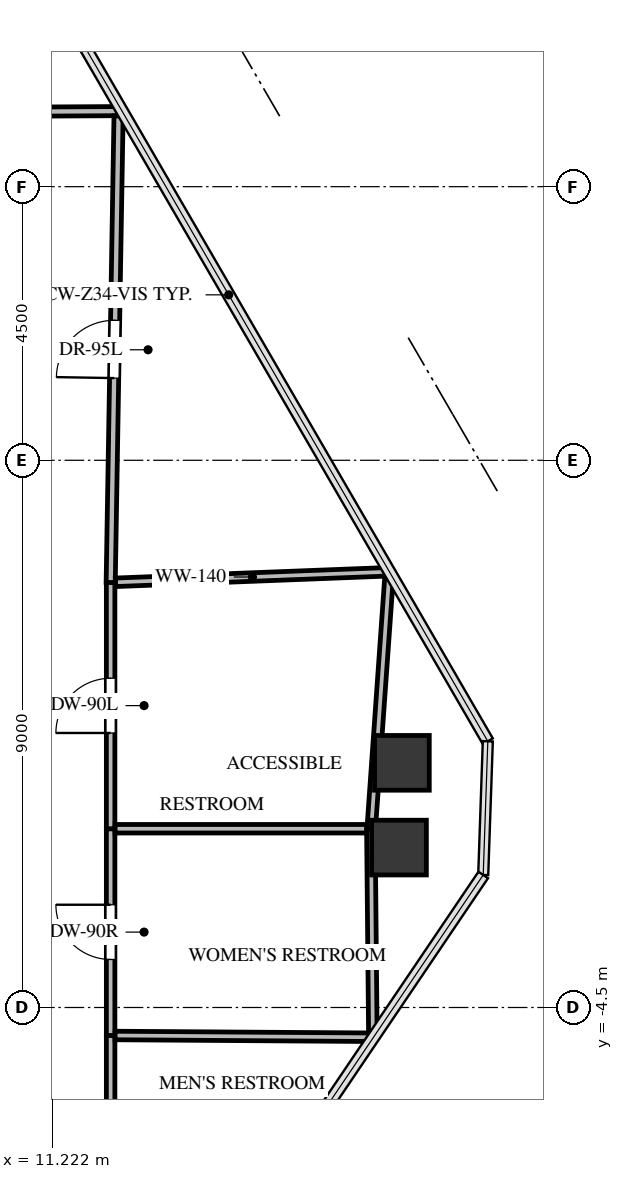
"""IFC4 building model, lengths in metres.
Left out: names, types, materials, properties, quantities, classifications, styles, units other than length and angle.
Written with IfcOpenShell. Run it as: python <this file> out.ifc"""

import sys

from ifc_helpers import new_model, si_unit, direction, frame, frame_2d, origin, origin_2d, place, context, subcontext, project, spatial, rectangle, extrude, source, transform, mapped, element, fill, save


model = new_model("IFC4")
c1 = context("Model", 3, precision=1e-05, world=origin(), true_north=direction((0.0, 1.0)))
c2 = subcontext(c1, "Body", "Model", "MODEL_VIEW")
j1 = project(units=[si_unit("LENGTHUNIT", "METRE"), si_unit("PLANEANGLEUNIT", "RADIAN")], contexts=[c1])
p1 = place(None, origin())
s1 = spatial("IfcSite", under=j1, at=p1, CompositionType="ELEMENT")
p2 = place(p1, origin())
s2 = spatial("IfcBuilding", under=s1, at=p2, CompositionType="ELEMENT")
p3 = place(p2, frame((0.0, 0.0, 244.7)))
s3 = spatial("IfcBuildingStorey", under=s2, at=p3, CompositionType="ELEMENT", Elevation=244.7)
m1 = source(origin(), c2, "Body", "SweptSolid", [
    extrude(rectangle(XDim=0.9, YDim=0.9, at=origin_2d()), origin(), (0.0, 0.0, 1.0), 3.3),
])
for number, where, z_axis, x_axis in (
    (1, (16.97, -0.476, -0.24), (0.0, 0.0, 1.0), (1.0, 0.0, 0.0)),
    (2, (16.922, -1.87, -0.24), (0.0, 0.0, 1.0), (1.0, 0.0, 0.0)),
):
    element("IfcColumn", number, at=place(p3, frame(where, z_axis=z_axis, x_axis=x_axis)), inside=s3, PredefinedType="COLUMN", context=c2, shape_type="MappedRepresentation", body=[
        mapped(m1, transform((0.0, 0.0, 0.0), x_axis=(1.0, 0.0, 0.0), y_axis=(0.0, 1.0, 0.0), z_axis=(0.0, 0.0, 1.0), scale=1.0)),
    ])
p4 = place(p3, frame((12.18, -8.44, 0.0), z_axis=(0.0, 0.0, 1.0), x_axis=(0.0, 1.0, 0.0)))
e3 = element("IfcWall", 3, at=p4, inside=s3, PredefinedType="PARTITIONING", context=c2, shape_type="SweptSolid", body=[
    extrude(rectangle(XDim=3.48, YDim=0.14, at=frame_2d((1.74, 0.0))), origin(), (0.0, 0.0, 1.0), 2.399),
])
p5 = place(p4, frame((1.29, 0.0, 0.0)))
e4 = element("IfcOpeningElement", 4, at=p5, cuts=e3, PredefinedType="OPENING", context=c2, shape_type="SweptSolid", body=[
    extrude(rectangle(XDim=0.9, YDim=2.05, at=frame_2d((0.45, 1.025))), frame((0.0, 0.08, 0.0), z_axis=(0.0, -1.0, 0.0), x_axis=(1.0, 0.0, 0.0)), (0.0, 0.0, 1.0), 0.16),
])
p6 = place(p3, frame((12.18, -4.96, 0.0), z_axis=(0.0, 0.0, 1.0), x_axis=(0.0, 1.0, 0.0)))
e5 = element("IfcWall", 5, at=p6, inside=s3, PredefinedType="PARTITIONING", context=c2, shape_type="SweptSolid", body=[
    extrude(rectangle(XDim=3.4, YDim=0.14, at=frame_2d((1.7, 0.0))), origin(), (0.0, 0.0, 1.0), 3.045),
])
p7 = place(p6, frame((1.25, 0.0, 0.0)))
e6 = element("IfcOpeningElement", 6, at=p7, cuts=e5, PredefinedType="OPENING", context=c2, shape_type="SweptSolid", body=[
    extrude(rectangle(XDim=0.9, YDim=2.05, at=frame_2d((0.45, 1.025))), frame((0.0, 0.08, 0.0), z_axis=(0.0, -1.0, 0.0), x_axis=(1.0, 0.0, 0.0)), (0.0, 0.0, 1.0), 0.16),
])
p8 = place(p3, frame((12.18, -1.56, 0.0), z_axis=(0.0, 0.0, 1.0), x_axis=(0.0, 1.0, 0.0)))
e7 = element("IfcWall", 7, at=p8, inside=s3, PredefinedType="PARTITIONING", context=c2, shape_type="SweptSolid", body=[
    extrude(rectangle(XDim=4.05, YDim=0.14, at=frame_2d((2.025, 0.0))), origin(), (0.0, 0.0, 1.0), 2.301),
])
p9 = place(p8, frame((1.575, 0.0, 0.0)))
e8 = element("IfcOpeningElement", 8, at=p9, cuts=e7, PredefinedType="OPENING", context=c2, shape_type="SweptSolid", body=[
    extrude(rectangle(XDim=0.9, YDim=2.05, at=frame_2d((0.45, 1.025))), frame((0.0, 0.08, 0.0), z_axis=(0.0, -1.0, 0.0), x_axis=(1.0, 0.0, 0.0)), (0.0, 0.0, 1.0), 0.16),
])
p10 = place(p3, frame((12.368, 10.243, 0.0), z_axis=(0.0, 0.0, 1.0), x_axis=(-0.999984623931, -0.005545439622, 0.0)))
e9 = element("IfcWall", 9, at=p10, inside=s3, PredefinedType="PARTITIONING", context=c2, shape_type="SweptSolid", body=[
    extrude(rectangle(XDim=11.359, YDim=0.15, at=frame_2d((5.679, 0.0))), origin(), (0.0, 0.0, 1.0), 2.301),
])
p11 = place(p10, frame((5.219, 0.0, 0.0)))
e10 = element("IfcOpeningElement", 10, at=p11, cuts=e9, PredefinedType="OPENING", context=c2, shape_type="SweptSolid", body=[
    extrude(rectangle(XDim=0.92, YDim=2.1, at=frame_2d((0.46, 1.05))), frame((0.0, 0.085, 0.0), z_axis=(0.0, -1.0, 0.0), x_axis=(1.0, 0.0, 0.0)), (0.0, 0.0, 1.0), 0.17),
])
p12 = place(p3, frame((12.181, 2.49, 0.0), z_axis=(0.0, 0.0, 1.0), x_axis=(0.016828134389, 0.999858396921, 0.0)))
e11 = element("IfcWall", 11, at=p12, inside=s3, PredefinedType="PARTITIONING", context=c2, shape_type="SweptSolid", body=[
    extrude(rectangle(XDim=7.675, YDim=0.15, at=frame_2d((3.837, 0.0))), origin(), (0.0, 0.0, 1.0), 2.399),
])
p13 = place(p12, frame((3.362, 0.0, 0.0)))
e12 = element("IfcOpeningElement", 12, at=p13, cuts=e11, PredefinedType="OPENING", context=c2, shape_type="SweptSolid", body=[
    extrude(rectangle(XDim=0.95, YDim=2.1, at=frame_2d((0.475, 1.05))), frame((0.0, 0.085, 0.0), z_axis=(0.0, -1.0, 0.0), x_axis=(1.0, 0.0, 0.0)), (0.0, 0.0, 1.0), 0.17),
])
p14 = place(p3, frame((12.254, -4.96, 0.0), z_axis=(0.0, 0.0, 1.0), x_axis=(0.999976630429, -0.006836563198, 0.0)))
e13 = element("IfcWall", 13, at=p14, inside=s3, PredefinedType="PARTITIONING", context=c2, shape_type="SweptSolid", body=[
    extrude(rectangle(XDim=4.25, YDim=0.14, at=frame_2d((2.125, 0.0))), origin(), (0.0, 0.0, 1.0), 2.399),
])
p15 = place(p3, frame((12.254, -1.56, 0.0), z_axis=(0.0, 0.0, 1.0), x_axis=(1.0, 0.0, 0.0)))
e14 = element("IfcWall", 14, at=p15, inside=s3, PredefinedType="PARTITIONING", context=c2, shape_type="SweptSolid", body=[
    extrude(rectangle(XDim=4.206, YDim=0.14, at=frame_2d((2.103, 0.0))), origin(), (0.0, 0.0, 1.0), 2.301),
])
p16 = place(p3, frame((16.46, -1.56, 0.0), z_axis=(0.0, 0.0, 1.0), x_axis=(0.009604446748, -0.999953876238, 0.0)))
e15 = element("IfcWall", 15, at=p16, inside=s3, PredefinedType="PARTITIONING", context=c2, shape_type="SweptSolid", body=[
    extrude(rectangle(XDim=3.355, YDim=0.14, at=frame_2d((1.678, 0.0))), origin(), (0.0, 0.0, 1.0), 2.301),
])
p17 = place(p3, frame((12.26, 2.493, 0.0), z_axis=(0.0, 0.0, 1.0), x_axis=(0.999256206289, 0.038562082324, 0.0)))
e16 = element("IfcWall", 16, at=p17, inside=s3, PredefinedType="PARTITIONING", context=c2, shape_type="SweptSolid", body=[
    extrude(rectangle(XDim=4.508, YDim=0.14, at=frame_2d((2.254, 0.0))), origin(), (0.0, 0.0, 1.0), 2.399),
])
p18 = place(p3, frame((16.76, 2.593, 0.0), z_axis=(0.0, 0.0, 1.0), x_axis=(-0.07055102187, -0.997508172053, 0.0)))
e17 = element("IfcWall", 17, at=p18, inside=s3, PredefinedType="PARTITIONING", context=c2, shape_type="SweptSolid", body=[
    extrude(rectangle(XDim=4.163, YDim=0.14, at=frame_2d((2.082, 0.0))), origin(), (0.0, 0.0, 1.0), 2.301),
])
m2 = source(origin(), c2, "Body", "SweptSolid", [
    extrude(rectangle(XDim=0.9, YDim=2.05, at=frame_2d((0.45, 1.025))), frame((0.0, 0.025, 0.0), z_axis=(0.0, -1.0, 0.0), x_axis=(1.0, 0.0, 0.0)), (0.0, 0.0, 1.0), 0.05),
])
p19 = place(p7, origin())
e18 = element("IfcDoor", 18, at=p19, inside=s3, OperationType="SINGLE_SWING_RIGHT", PredefinedType="DOOR", context=c2, shape_type="MappedRepresentation", body=[
    mapped(m2, transform((0.0, 0.0, 0.0), x_axis=(1.0, 0.0, 0.0), y_axis=(0.0, 1.0, 0.0), z_axis=(0.0, 0.0, 1.0), scale=1.0)),
])
fill(e6, e18)
m3 = source(origin(), c2, "Body", "SweptSolid", [
    extrude(rectangle(XDim=0.9, YDim=2.05, at=frame_2d((0.45, 1.025))), frame((0.0, 0.025, 0.0), z_axis=(0.0, -1.0, 0.0), x_axis=(1.0, 0.0, 0.0)), (0.0, 0.0, 1.0), 0.05),
])
p20 = place(p9, origin())
e19 = element("IfcDoor", 19, at=p20, inside=s3, OperationType="SINGLE_SWING_LEFT", PredefinedType="DOOR", context=c2, shape_type="MappedRepresentation", body=[
    mapped(m3, transform((0.0, 0.0, 0.0), x_axis=(1.0, 0.0, 0.0), y_axis=(0.0, 1.0, 0.0), z_axis=(0.0, 0.0, 1.0), scale=1.0)),
])
fill(e8, e19)
m4 = source(origin(), c2, "Body", "SweptSolid", [
    extrude(rectangle(XDim=0.95, YDim=2.1, at=frame_2d((0.475, 1.05))), frame((0.0, 0.025, 0.0), z_axis=(0.0, -1.0, 0.0), x_axis=(1.0, 0.0, 0.0)), (0.0, 0.0, 1.0), 0.05),
])
p21 = place(p13, origin())
e20 = element("IfcDoor", 20, at=p21, inside=s3, OperationType="SINGLE_SWING_LEFT", PredefinedType="DOOR", context=c2, shape_type="MappedRepresentation", body=[
    mapped(m4, transform((0.0, 0.0, 0.0), x_axis=(1.0, 0.0, 0.0), y_axis=(0.0, 1.0, 0.0), z_axis=(0.0, 0.0, 1.0), scale=1.0)),
])
fill(e12, e20)
save(model, sys.argv[1])
